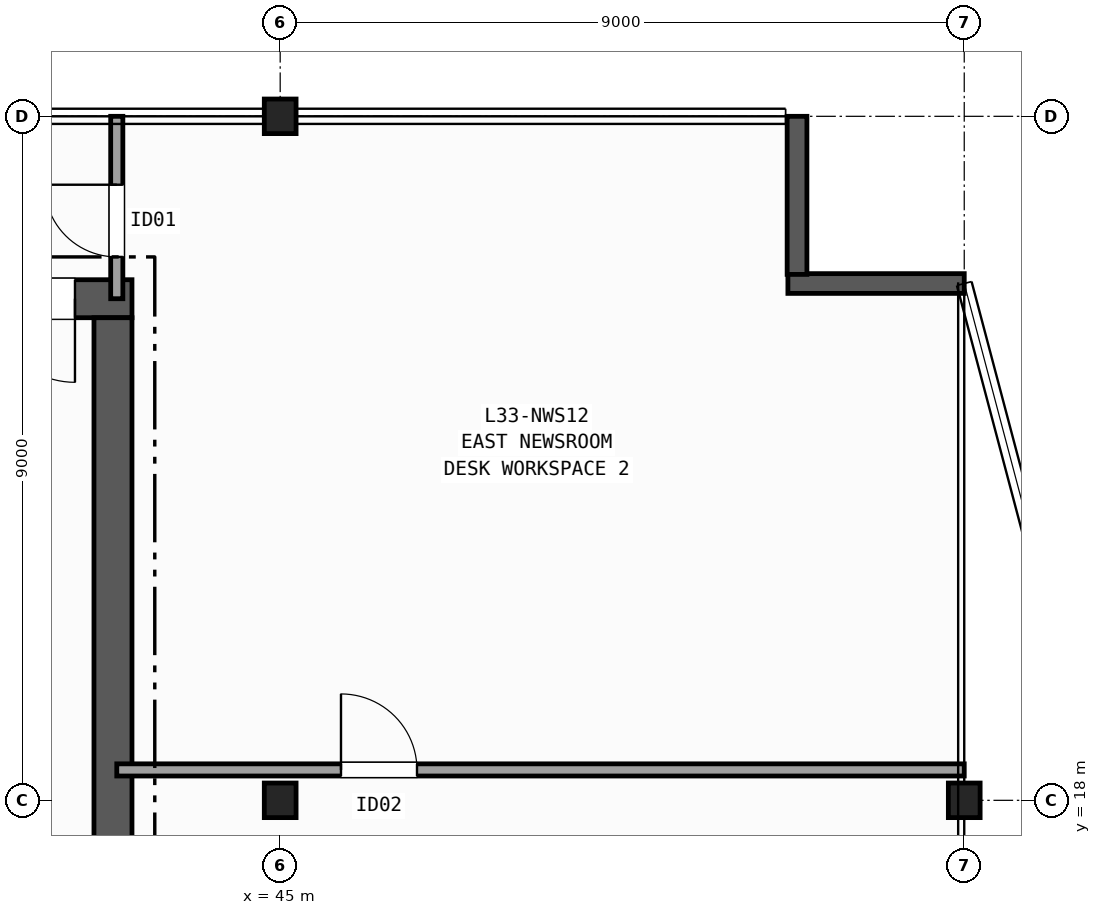
"""IFC4 building model, lengths in metres.
Left out: names, types, materials, properties, quantities, classifications, styles, units other than length and angle.
Written with IfcOpenShell. Run it as: python <this file> out.ifc"""

import sys

from ifc_helpers import new_model, si_unit, direction, frame, frame_2d, origin, origin_2d, place, context, subcontext, project, spatial, rectangle, i_section, extrude, element, fill, save


model = new_model("IFC4")
c1 = context("Model", 3, precision=1e-05, world=origin(), true_north=direction((0.0, 1.0)))
c2 = subcontext(c1, "Body", "Model", "MODEL_VIEW")
j1 = project(units=[si_unit("LENGTHUNIT", "METRE"), si_unit("PLANEANGLEUNIT", "RADIAN")], contexts=[c1])
p1 = place(None, origin())
s1 = spatial("IfcSite", under=j1, at=p1, CompositionType="ELEMENT")
p2 = place(p1, origin())
s2 = spatial("IfcBuilding", under=s1, at=p2, CompositionType="ELEMENT")
p3 = place(p2, frame((0.0, 0.0, 135.9)))
s3 = spatial("IfcBuildingStorey", under=s2, at=p3, CompositionType="ELEMENT", Elevation=135.9)
for number, where, z_axis, x_axis in (
    (1, (45.0, 18.0, 0.0), (0.0, 0.0, 1.0), (1.0, 0.0, 0.0)),
    (2, (45.0, 27.0, 0.0), (0.0, 0.0, 1.0), (1.0, 0.0, 0.0)),
    (3, (54.0, 18.0, 0.0), (0.0, 0.0, 1.0), (1.0, 0.0, 0.0)),
):
    element("IfcColumn", number, at=place(p3, frame(where, z_axis=z_axis, x_axis=x_axis)), inside=s3, PredefinedType="COLUMN", context=c2, shape_type="SweptSolid", body=[
        extrude(i_section(OverallWidth=0.418, OverallDepth=0.455, WebThickness=0.042, FlangeThickness=0.068, FilletRadius=0.015, at=origin_2d()), origin(), (0.0, 0.0, 1.0), 3.7),
    ])
p4 = place(p3, frame((54.0, 24.8, 0.0), z_axis=(0.0, 0.0, 1.0), x_axis=(-1.0, 0.0, 0.0)))
e4 = element("IfcWall", 4, at=p4, inside=s3, PredefinedType="SOLIDWALL", context=c2, shape_type="SweptSolid", body=[
    extrude(rectangle(XDim=2.32, YDim=0.26, at=frame_2d((1.16, 0.0))), origin(), (0.0, 0.0, 1.0), 3.42),
])
p5 = place(p3, frame((51.8, 24.92, 0.0), z_axis=(0.0, 0.0, 1.0), x_axis=(0.0, 1.0, 0.0)))
e5 = element("IfcWall", 5, at=p5, inside=s3, PredefinedType="SOLIDWALL", context=c2, shape_type="SweptSolid", body=[
    extrude(rectangle(XDim=2.08, YDim=0.26, at=frame_2d((1.04, 0.0))), origin(), (0.0, 0.0, 1.0), 3.42),
])
p6 = place(p3, frame((43.05, 24.6, 0.0), z_axis=(0.0, 0.0, 1.0), x_axis=(-1.0, 0.0, 0.0)))
e6 = element("IfcWall", 6, at=p6, inside=s3, PredefinedType="SHEAR", context=c2, shape_type="SweptSolid", body=[
    extrude(rectangle(XDim=13.9, YDim=0.5, at=frame_2d((6.95, 0.0))), origin(), (0.0, 0.0, 1.0), 3.42),
])
p7 = place(p6, frame((0.75, 0.0, 0.0)))
e7 = element("IfcOpeningElement", 7, at=p7, cuts=e6, PredefinedType="OPENING", context=c2, shape_type="SweptSolid", body=[
    extrude(rectangle(XDim=1.1, YDim=2.15, at=frame_2d((0.55, 1.075))), frame((0.0, 0.26, 0.0), z_axis=(0.0, -1.0, 0.0), x_axis=(1.0, 0.0, 0.0)), (0.0, 0.0, 1.0), 0.52),
])
p8 = place(p6, frame((2.25, 0.0, 0.0)))
e8 = element("IfcOpeningElement", 8, at=p8, cuts=e6, PredefinedType="OPENING", context=c2, shape_type="SweptSolid", body=[
    extrude(rectangle(XDim=0.9, YDim=2.1, at=frame_2d((0.45, 1.05))), frame((0.0, 0.26, 0.0), z_axis=(0.0, -1.0, 0.0), x_axis=(1.0, 0.0, 0.0)), (0.0, 0.0, 1.0), 0.52),
])
p9 = place(p6, frame((3.55, 0.0, 0.0)))
e9 = element("IfcOpeningElement", 9, at=p9, cuts=e6, PredefinedType="OPENING", context=c2, shape_type="SweptSolid", body=[
    extrude(rectangle(XDim=0.9, YDim=2.1, at=frame_2d((0.45, 1.05))), frame((0.0, 0.26, 0.0), z_axis=(0.0, -1.0, 0.0), x_axis=(1.0, 0.0, 0.0)), (0.0, 0.0, 1.0), 0.52),
])
p10 = place(p6, frame((4.9, 0.0, 0.0)))
e10 = element("IfcOpeningElement", 10, at=p10, cuts=e6, PredefinedType="OPENING", context=c2, shape_type="SweptSolid", body=[
    extrude(rectangle(XDim=0.9, YDim=2.1, at=frame_2d((0.45, 1.05))), frame((0.0, 0.26, 0.0), z_axis=(0.0, -1.0, 0.0), x_axis=(1.0, 0.0, 0.0)), (0.0, 0.0, 1.0), 0.52),
])
p11 = place(p3, frame((42.8, 11.45, 0.0), z_axis=(0.0, 0.0, 1.0), x_axis=(0.0, 1.0, 0.0)))
e11 = element("IfcWall", 11, at=p11, inside=s3, PredefinedType="SHEAR", context=c2, shape_type="SweptSolid", body=[
    extrude(rectangle(XDim=12.9, YDim=0.5, at=frame_2d((6.45, 0.0))), origin(), (0.0, 0.0, 1.0), 3.42),
])
p12 = place(p3, frame((42.85, 24.6, 0.0), z_axis=(0.0, 0.0, 1.0), x_axis=(0.0, 1.0, 0.0)))
e12 = element("IfcWall", 12, at=p12, inside=s3, PredefinedType="PARTITIONING", context=c2, shape_type="SweptSolid", body=[
    extrude(rectangle(XDim=2.4, YDim=0.16, at=frame_2d((1.2, 0.0))), origin(), (0.0, 0.0, 1.0), 2.634),
])
p13 = place(p12, frame((0.55, 0.0, 0.0)))
e13 = element("IfcOpeningElement", 13, at=p13, cuts=e12, PredefinedType="OPENING", context=c2, shape_type="SweptSolid", body=[
    extrude(rectangle(XDim=0.95, YDim=2.1, at=frame_2d((0.475, 1.05))), frame((0.0, 0.09, 0.0), z_axis=(0.0, -1.0, 0.0), x_axis=(1.0, 0.0, 0.0)), (0.0, 0.0, 1.0), 0.18),
])
p14 = place(p3, frame((42.85, 18.4, 0.0), z_axis=(0.0, 0.0, 1.0), x_axis=(1.0, 0.0, 0.0)))
e14 = element("IfcWall", 14, at=p14, inside=s3, PredefinedType="PARTITIONING", context=c2, shape_type="SweptSolid", body=[
    extrude(rectangle(XDim=11.15, YDim=0.16, at=frame_2d((5.575, 0.0))), origin(), (0.0, 0.0, 1.0), 3.42),
])
p15 = place(p14, frame((2.95, 0.0, 0.0)))
e15 = element("IfcOpeningElement", 15, at=p15, cuts=e14, PredefinedType="OPENING", context=c2, shape_type="SweptSolid", body=[
    extrude(rectangle(XDim=1.0, YDim=2.1, at=frame_2d((0.5, 1.05))), frame((0.0, 0.09, 0.0), z_axis=(0.0, -1.0, 0.0), x_axis=(1.0, 0.0, 0.0)), (0.0, 0.0, 1.0), 0.18),
])
p16 = place(p7, origin())
e16 = element("IfcDoor", 16, at=p16, inside=s3, OperationType="SINGLE_SWING_LEFT", PredefinedType="DOOR", context=c2, shape_type="SweptSolid", body=[
    extrude(rectangle(XDim=1.1, YDim=2.15, at=frame_2d((0.55, 1.075))), frame((0.0, 0.025, 0.0), z_axis=(0.0, -1.0, 0.0), x_axis=(1.0, 0.0, 0.0)), (0.0, 0.0, 1.0), 0.05),
])
fill(e7, e16)
p17 = place(p13, origin())
e17 = element("IfcDoor", 17, at=p17, inside=s3, OperationType="SINGLE_SWING_RIGHT", PredefinedType="DOOR", context=c2, shape_type="SweptSolid", body=[
    extrude(rectangle(XDim=0.95, YDim=2.1, at=frame_2d((0.475, 1.05))), frame((0.0, 0.025, 0.0), z_axis=(0.0, -1.0, 0.0), x_axis=(1.0, 0.0, 0.0)), (0.0, 0.0, 1.0), 0.05),
])
fill(e13, e17)
p18 = place(p15, origin())
e18 = element("IfcDoor", 18, at=p18, inside=s3, OperationType="SINGLE_SWING_LEFT", PredefinedType="DOOR", context=c2, shape_type="SweptSolid", body=[
    extrude(rectangle(XDim=1.0, YDim=2.1, at=frame_2d((0.5, 1.05))), frame((0.0, 0.025, 0.0), z_axis=(0.0, -1.0, 0.0), x_axis=(1.0, 0.0, 0.0)), (0.0, 0.0, 1.0), 0.05),
])
fill(e15, e18)
save(model, sys.argv[1])
